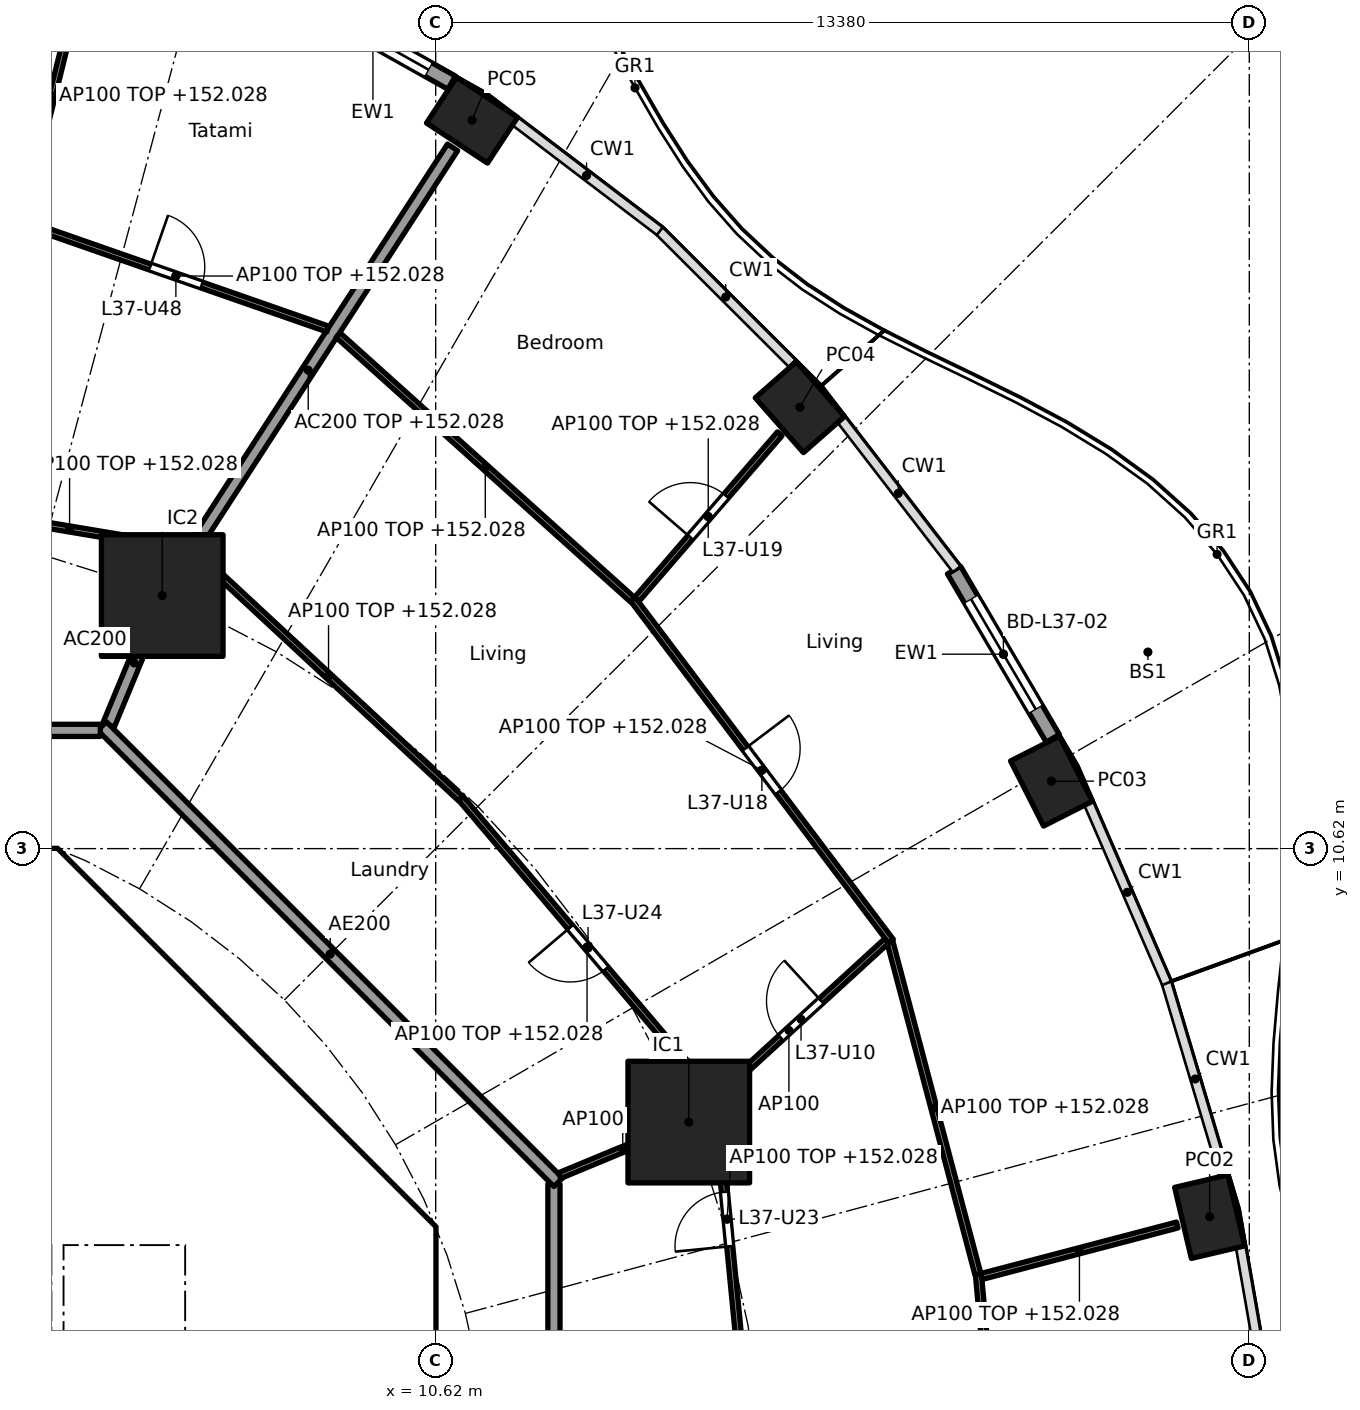
"""IFC4 building model, lengths in metres.
Left out: names, types, materials, properties, quantities, classifications, styles, units other than length and angle.
Written with IfcOpenShell. Run it as: python <this file> out.ifc"""

import sys

from ifc_helpers import new_model, si_unit, direction, frame, frame_2d, origin, origin_2d, place, context, subcontext, project, spatial, polyline, rectangle, hollow_rectangle, outline, extrude, element, fill, save


model = new_model("IFC4")
c1 = context("Model", 3, precision=1e-05, world=origin(), true_north=direction((0.0, 1.0)))
c2 = subcontext(c1, "Body", "Model", "MODEL_VIEW")
j1 = project(units=[si_unit("LENGTHUNIT", "METRE"), si_unit("PLANEANGLEUNIT", "RADIAN")], contexts=[c1])
p1 = place(None, origin())
s1 = spatial("IfcSite", under=j1, at=p1, CompositionType="ELEMENT")
p2 = place(p1, origin())
s2 = spatial("IfcBuilding", under=s1, at=p2, CompositionType="ELEMENT")
p3 = place(p2, frame((0.0, 0.0, 149.2)))
s3 = spatial("IfcBuildingStorey", under=s2, at=p3, CompositionType="ELEMENT", Elevation=149.2)
for number, where, z_axis, x_axis in (
    (1, (23.348, 4.568, 0.0), (0.0, 0.0, 1.0), (-0.229, 0.973, 0.0)),
    (2, (20.747, 11.73, 0.0), (0.0, 0.0, 1.0), (-0.452, 0.892, 0.0)),
    (3, (16.61, 17.88, 0.0), (0.0, 0.0, 1.0), (-0.66, 0.751, 0.0)),
    (4, (11.218, 22.599, 0.0), (0.0, 0.0, 1.0), (-0.836, 0.549, 0.0)),
):
    element("IfcColumn", number, at=place(p3, frame(where, z_axis=z_axis, x_axis=x_axis)), inside=s3, PredefinedType="COLUMN", context=c2, shape_type="SweptSolid", body=[
        extrude(hollow_rectangle(XDim=1.2, YDim=0.9, WallThickness=0.04, at=origin_2d()), origin(), (0.0, 0.0, 1.0), 3.7),
    ])
for number, where, z_axis, x_axis in (
    (5, (14.782, 6.123, 0.0), (0.0, 0.0, 1.0), (1.0, 0.0, 0.0)),
    (6, (6.123, 14.782, 0.0), (0.0, 0.0, 1.0), (1.0, 0.0, 0.0)),
):
    element("IfcColumn", number, at=place(p3, frame(where, z_axis=z_axis, x_axis=x_axis)), inside=s3, PredefinedType="COLUMN", context=c2, shape_type="SweptSolid", body=[
        extrude(rectangle(XDim=2.0, YDim=2.0, at=origin_2d()), origin(), (0.0, 0.0, 1.0), 3.7),
    ])
p4 = place(p3, frame((19.144, 15.201, 0.0), z_axis=(0.0, 0.0, 1.0), x_axis=(0.506314982873, -0.862348617508, 0.0)))
e7 = element("IfcWall", 7, at=p4, inside=s3, PredefinedType="SOLIDWALL", context=c2, shape_type="SweptSolid", body=[
    extrude(rectangle(XDim=3.208, YDim=0.25, at=frame_2d((1.604, 0.0))), origin(), (0.0, 0.0, 1.0), 3.44),
])
p5 = place(p4, frame((0.554, 0.0, 0.0)))
e8 = element("IfcOpeningElement", 8, at=p5, cuts=e7, PredefinedType="OPENING", context=c2, shape_type="SweptSolid", body=[
    extrude(rectangle(XDim=2.1, YDim=2.4, at=frame_2d((1.05, 1.2))), frame((0.0, 0.135, 0.0), z_axis=(0.0, -1.0, 0.0), x_axis=(1.0, 0.0, 0.0)), (0.0, 0.0, 1.0), 0.27),
])
p6 = place(p3, frame((8.293, 24.67, 0.0), z_axis=(0.0, 0.0, 1.0), x_axis=(0.87206688547, -0.489386705241, 0.0)))
e9 = element("IfcWall", 9, at=p6, inside=s3, PredefinedType="SOLIDWALL", context=c2, shape_type="SweptSolid", body=[
    extrude(rectangle(XDim=2.97, YDim=0.25, at=frame_2d((1.485, 0.0))), origin(), (0.0, 0.0, 1.0), 3.44),
])
p7 = place(p6, frame((0.435, 0.0, 0.0)))
e10 = element("IfcOpeningElement", 10, at=p7, cuts=e9, PredefinedType="OPENING", context=c2, shape_type="SweptSolid", body=[
    extrude(rectangle(XDim=2.1, YDim=2.4, at=frame_2d((1.05, 1.2))), frame((0.0, 0.135, 0.0), z_axis=(0.0, -1.0, 0.0), x_axis=(1.0, 0.0, 0.0)), (0.0, 0.0, 1.0), 0.27),
])
p8 = place(p3, frame((9.988, 4.613, 0.0), z_axis=(0.0, 0.0, 1.0), x_axis=(-0.707106781187, 0.707106781187, 0.0)))
e11 = element("IfcWall", 11, at=p8, inside=s3, PredefinedType="SHEAR", context=c2, shape_type="SweptSolid", body=[
    extrude(rectangle(XDim=7.602, YDim=0.6, at=frame_2d((3.801, 0.0))), origin(), (0.0, 0.0, 1.0), 3.44),
])
p9 = place(p8, frame((3.201, 0.0, 0.0)))
e12 = element("IfcOpeningElement", 12, at=p9, cuts=e11, PredefinedType="OPENING", context=c2, shape_type="SweptSolid", body=[
    extrude(rectangle(XDim=1.2, YDim=2.1, at=frame_2d((0.6, 1.05))), frame((0.0, 0.31, 0.0), z_axis=(0.0, -1.0, 0.0), x_axis=(1.0, 0.0, 0.0)), (0.0, 0.0, 1.0), 0.62),
])
p10 = place(p3, frame((6.7, 4.0, 0.0), z_axis=(0.0, 0.0, 1.0), x_axis=(1.0, 0.0, 0.0)))
e13 = element("IfcWall", 13, at=p10, inside=s3, PredefinedType="SOLIDWALL", context=c2, shape_type="SweptSolid", body=[
    extrude(rectangle(XDim=3.325, YDim=0.2, at=frame_2d((1.662, 0.0))), origin(), (0.0, 0.0, 1.0), 3.44),
])
p11 = place(p10, frame((1.25, 0.0, 0.0)))
e14 = element("IfcOpeningElement", 14, at=p11, cuts=e13, PredefinedType="OPENING", context=c2, shape_type="SweptSolid", body=[
    extrude(rectangle(XDim=1.1, YDim=2.1, at=frame_2d((0.55, 1.05))), frame((0.0, 0.11, 0.0), z_axis=(0.0, -1.0, 0.0), x_axis=(1.0, 0.0, 0.0)), (0.0, 0.0, 1.0), 0.22),
])
p12 = place(p3, origin())
e15 = element("IfcWall", 15, at=p12, inside=s3, PredefinedType="SHEAR", context=c2, shape_type="SweptSolid", body=[
    extrude(outline(polyline([(-4.152, 10.025), (-4.401, 9.776), (-4.825, 10.2), (-4.401, 10.625), (4.401, 10.625), (4.825, 10.2), (4.401, 9.776), (4.152, 10.025), (-4.152, 10.025)])), origin(), (0.0, 0.0, 1.0), 3.44),
])
p13 = place(p3, origin())
e16 = element("IfcWall", 16, at=p13, inside=s3, PredefinedType="SHEAR", context=c2, shape_type="SweptSolid", body=[
    extrude(outline(polyline([(9.776, -4.401), (10.025, -4.152), (10.025, -3.801), (10.025, 4.152), (9.776, 4.401), (10.2, 4.825), (10.625, 4.401), (10.625, -4.401), (10.2, -4.825), (9.776, -4.401)])), origin(), (0.0, 0.0, 1.0), 3.44),
])
p14 = place(p3, origin())
e17 = element("IfcWall", 17, at=p14, inside=s3, PredefinedType="SOLIDWALL", context=c2, shape_type="SweptSolid", body=[
    extrude(outline(polyline([(-6.5, 2.1), (-6.7, 2.1), (-6.7, 4.3), (6.7, 4.3), (6.7, 2.1), (6.5, 2.1), (6.5, 4.1), (4.5, 4.1), (4.5, 2.1), (4.3, 2.1), (4.3, 4.1), (2.3, 4.1), (2.3, 2.1), (2.1, 2.1), (2.1, 4.1), (0.1, 4.1), (0.1, 2.1), (-0.1, 2.1), (-0.1, 4.1), (-2.1, 4.1), (-2.1, 2.1), (-2.3, 2.1), (-2.3, 4.1), (-4.3, 4.1), (-4.3, 2.1), (-4.5, 2.1), (-4.5, 4.1), (-6.5, 4.1), (-6.5, 2.1)])), origin(), (0.0, 0.0, 1.0), 3.44),
])
p15 = place(p3, origin())
e18 = element("IfcWall", 18, at=p15, inside=s3, PredefinedType="SOLIDWALL", context=c2, shape_type="SweptSolid", body=[
    extrude(outline(polyline([(7.025, -3.9), (6.7, -3.9), (6.7, 3.9), (7.025, 3.9), (7.025, -3.9)])), origin(), (0.0, 0.0, 1.0), 3.44),
])
p16 = place(p3, frame((5.243, 12.657, 0.0), z_axis=(0.0, 0.0, 1.0), x_axis=(0.38273085373, 0.923859888513, 0.0)))
e19 = element("IfcWall", 19, at=p16, inside=s3, PredefinedType="PARTITIONING", context=c2, shape_type="SweptSolid", body=[
    extrude(rectangle(XDim=2.199, YDim=0.2, at=frame_2d((1.1, 0.0))), origin(), (0.0, 0.0, 1.0), 3.44),
])
p17 = place(p3, frame((6.15, 14.824, 0.0), z_axis=(0.0, 0.0, 1.0), x_axis=(0.543695254109, 0.839282711998, 0.0)))
e20 = element("IfcWall", 20, at=p17, inside=s3, PredefinedType="PARTITIONING", context=c2, shape_type="SweptSolid", body=[
    extrude(rectangle(XDim=8.731, YDim=0.2, at=frame_2d((4.366, 0.0))), origin(), (0.0, 0.0, 1.0), 2.828),
])
p18 = place(p3, frame((12.565, -5.104, 0.0), z_axis=(0.0, 0.0, 1.0), x_axis=(0.0, 1.0, 0.0)))
e21 = element("IfcWall", 21, at=p18, inside=s3, PredefinedType="PARTITIONING", context=c2, shape_type="SweptSolid", body=[
    extrude(rectangle(XDim=10.209, YDim=0.2, at=frame_2d((5.104, 0.0))), origin(), (0.0, 0.0, 1.0), 3.44),
])
p19 = place(p3, frame((12.635, 5.134, 0.0), z_axis=(0.0, 0.0, 1.0), x_axis=(-0.707106781187, 0.707106781187, 0.0)))
e22 = element("IfcWall", 22, at=p19, inside=s3, PredefinedType="PARTITIONING", context=c2, shape_type="SweptSolid", body=[
    extrude(rectangle(XDim=10.609, YDim=0.2, at=frame_2d((5.305, 0.0))), origin(), (0.0, 0.0, 1.0), 3.44),
])
p20 = place(p3, frame((5.104, 12.565, 0.0), z_axis=(0.0, 0.0, 1.0), x_axis=(-1.0, 0.0, 0.0)))
e23 = element("IfcWall", 23, at=p20, inside=s3, PredefinedType="PARTITIONING", context=c2, shape_type="SweptSolid", body=[
    extrude(rectangle(XDim=10.409, YDim=0.2, at=frame_2d((5.205, 0.0))), origin(), (0.0, 0.0, 1.0), 3.44),
])
p21 = place(p3, frame((20.106, -2.542, 0.0), z_axis=(0.0, 0.0, 1.0), x_axis=(-0.090567755363, 0.995890296011, 0.0)))
e24 = element("IfcWall", 24, at=p21, inside=s3, PredefinedType="PARTITIONING", context=c2, shape_type="SweptSolid", body=[
    extrude(rectangle(XDim=6.189, YDim=0.1, at=frame_2d((3.095, 0.0))), origin(), (0.0, 0.0, 1.0), 2.828),
])
p22 = place(p3, frame((15.602, 2.584, 0.0), z_axis=(0.0, 0.0, 1.0), x_axis=(-0.097207196705, 0.995264166394, 0.0)))
e25 = element("IfcWall", 25, at=p22, inside=s3, PredefinedType="PARTITIONING", context=c2, shape_type="SweptSolid", body=[
    extrude(rectangle(XDim=3.906, YDim=0.1, at=frame_2d((1.953, 0.0))), origin(), (0.0, 0.0, 1.0), 2.828),
])
p23 = place(p22, frame((1.503, 0.0, 0.0)))
e26 = element("IfcOpeningElement", 26, at=p23, cuts=e25, PredefinedType="OPENING", context=c2, shape_type="SweptSolid", body=[
    extrude(rectangle(XDim=0.9, YDim=2.1, at=frame_2d((0.45, 1.05))), frame((0.0, 0.06, 0.0), z_axis=(0.0, -1.0, 0.0), x_axis=(1.0, 0.0, 0.0)), (0.0, 0.0, 1.0), 0.12),
])
p24 = place(p3, frame((19.598, 3.584, 0.0), z_axis=(0.0, 0.0, 1.0), x_axis=(0.967108750962, 0.254363251695, 0.0)))
e27 = element("IfcWall", 27, at=p24, inside=s3, PredefinedType="PARTITIONING", context=c2, shape_type="SweptSolid", body=[
    extrude(rectangle(XDim=3.327, YDim=0.1, at=frame_2d((1.663, 0.0))), origin(), (0.0, 0.0, 1.0), 2.828),
])
p25 = place(p3, frame((19.537, 3.62, 0.0), z_axis=(0.0, 0.0, 1.0), x_axis=(-0.255892560316, 0.966705227862, 0.0)))
e28 = element("IfcWall", 28, at=p25, inside=s3, PredefinedType="PARTITIONING", context=c2, shape_type="SweptSolid", body=[
    extrude(rectangle(XDim=5.659, YDim=0.1, at=frame_2d((2.829, 0.0))), origin(), (0.0, 0.0, 1.0), 2.828),
])
p26 = place(p3, frame((12.657, 5.243, 0.0), z_axis=(0.0, 0.0, 1.0), x_axis=(0.923848837015, 0.382757529444, 0.0)))
e29 = element("IfcWall", 29, at=p26, inside=s3, PredefinedType="PARTITIONING", context=c2, shape_type="SweptSolid", body=[
    extrude(rectangle(XDim=2.25, YDim=0.1, at=frame_2d((1.125, 0.0))), origin(), (0.0, 0.0, 1.0), 3.44),
])
p27 = place(p3, frame((14.819, 6.157, 0.0), z_axis=(0.0, 0.0, 1.0), x_axis=(0.737620514432, 0.675215503887, 0.0)))
e30 = element("IfcWall", 30, at=p27, inside=s3, PredefinedType="PARTITIONING", context=c2, shape_type="SweptSolid", body=[
    extrude(rectangle(XDim=4.366, YDim=0.1, at=frame_2d((2.183, 0.0))), origin(), (0.0, 0.0, 1.0), 3.44),
])
p28 = place(p27, frame((2.003, 0.0, 0.0)))
e31 = element("IfcOpeningElement", 31, at=p28, cuts=e30, PredefinedType="OPENING", context=c2, shape_type="SweptSolid", body=[
    extrude(rectangle(XDim=0.9, YDim=2.1, at=frame_2d((0.45, 1.05))), frame((0.0, 0.06, 0.0), z_axis=(0.0, -1.0, 0.0), x_axis=(1.0, 0.0, 0.0)), (0.0, 0.0, 1.0), 0.12),
])
p29 = place(p3, frame((15.185, 6.559, 0.0), z_axis=(0.0, 0.0, 1.0), x_axis=(-0.647361044962, 0.762183493304, 0.0)))
e32 = element("IfcWall", 32, at=p29, inside=s3, PredefinedType="PARTITIONING", context=c2, shape_type="SweptSolid", body=[
    extrude(rectangle(XDim=6.413, YDim=0.1, at=frame_2d((3.207, 0.0))), origin(), (0.0, 0.0, 1.0), 2.828),
])
p30 = place(p29, frame((2.731, 0.0, 0.0)))
e33 = element("IfcOpeningElement", 33, at=p30, cuts=e32, PredefinedType="OPENING", context=c2, shape_type="SweptSolid", body=[
    extrude(rectangle(XDim=0.9, YDim=2.1, at=frame_2d((0.45, 1.05))), frame((0.0, 0.06, 0.0), z_axis=(0.0, -1.0, 0.0), x_axis=(1.0, 0.0, 0.0)), (0.0, 0.0, 1.0), 0.12),
])
p31 = place(p3, frame((18.106, 9.098, 0.0), z_axis=(0.0, 0.0, 1.0), x_axis=(-0.602398572907, 0.798195439325, 0.0)))
e34 = element("IfcWall", 34, at=p31, inside=s3, PredefinedType="PARTITIONING", context=c2, shape_type="SweptSolid", body=[
    extrude(rectangle(XDim=7.044, YDim=0.1, at=frame_2d((3.522, 0.0))), origin(), (0.0, 0.0, 1.0), 2.828),
])
p32 = place(p31, frame((3.072, 0.0, 0.0)))
e35 = element("IfcOpeningElement", 35, at=p32, cuts=e34, PredefinedType="OPENING", context=c2, shape_type="SweptSolid", body=[
    extrude(rectangle(XDim=0.9, YDim=2.1, at=frame_2d((0.45, 1.05))), frame((0.0, 0.06, 0.0), z_axis=(0.0, -1.0, 0.0), x_axis=(1.0, 0.0, 0.0)), (0.0, 0.0, 1.0), 0.12),
])
p33 = place(p3, frame((11.029, 11.443, 0.0), z_axis=(0.0, 0.0, 1.0), x_axis=(-0.733113447346, 0.680106369122, 0.0)))
e36 = element("IfcWall", 36, at=p33, inside=s3, PredefinedType="PARTITIONING", context=c2, shape_type="SweptSolid", body=[
    extrude(rectangle(XDim=5.923, YDim=0.1, at=frame_2d((2.961, 0.0))), origin(), (0.0, 0.0, 1.0), 2.828),
])
p34 = place(p3, frame((13.926, 14.719, 0.0), z_axis=(0.0, 0.0, 1.0), x_axis=(0.653831857253, 0.756639876323, 0.0)))
e37 = element("IfcWall", 37, at=p34, inside=s3, PredefinedType="PARTITIONING", context=c2, shape_type="SweptSolid", body=[
    extrude(rectangle(XDim=3.598, YDim=0.1, at=frame_2d((1.799, 0.0))), origin(), (0.0, 0.0, 1.0), 2.828),
])
p35 = place(p34, frame((1.349, 0.0, 0.0)))
e38 = element("IfcOpeningElement", 38, at=p35, cuts=e37, PredefinedType="OPENING", context=c2, shape_type="SweptSolid", body=[
    extrude(rectangle(XDim=0.9, YDim=2.1, at=frame_2d((0.45, 1.05))), frame((0.0, 0.06, 0.0), z_axis=(0.0, -1.0, 0.0), x_axis=(1.0, 0.0, 0.0)), (0.0, 0.0, 1.0), 0.12),
])
p36 = place(p3, frame((13.856, 14.714, 0.0), z_axis=(0.0, 0.0, 1.0), x_axis=(-0.743799395746, 0.668402916577, 0.0)))
e39 = element("IfcWall", 39, at=p36, inside=s3, PredefinedType="PARTITIONING", context=c2, shape_type="SweptSolid", body=[
    extrude(rectangle(XDim=6.509, YDim=0.1, at=frame_2d((3.254, 0.0))), origin(), (0.0, 0.0, 1.0), 2.828),
])
p37 = place(p3, frame((6.515, 15.556, 0.0), z_axis=(0.0, 0.0, 1.0), x_axis=(-0.986271328884, 0.16513287323, 0.0)))
e40 = element("IfcWall", 40, at=p37, inside=s3, PredefinedType="PARTITIONING", context=c2, shape_type="SweptSolid", body=[
    extrude(rectangle(XDim=3.884, YDim=0.1, at=frame_2d((1.942, 0.0))), origin(), (0.0, 0.0, 1.0), 2.828),
])
p38 = place(p3, frame((8.846, 19.165, 0.0), z_axis=(0.0, 0.0, 1.0), x_axis=(-0.944186503813, 0.329411362915, 0.0)))
e41 = element("IfcWall", 41, at=p38, inside=s3, PredefinedType="PARTITIONING", context=c2, shape_type="SweptSolid", body=[
    extrude(rectangle(XDim=5.293, YDim=0.1, at=frame_2d((2.646, 0.0))), origin(), (0.0, 0.0, 1.0), 2.828),
])
p39 = place(p38, frame((2.197, 0.0, 0.0)))
e42 = element("IfcOpeningElement", 42, at=p39, cuts=e41, PredefinedType="OPENING", context=c2, shape_type="SweptSolid", body=[
    extrude(rectangle(XDim=0.9, YDim=2.1, at=frame_2d((0.45, 1.05))), frame((0.0, 0.06, 0.0), z_axis=(0.0, -1.0, 0.0), x_axis=(1.0, 0.0, 0.0)), (0.0, 0.0, 1.0), 0.12),
])
p40 = place(p3, frame((3.813, 20.973, 0.0), z_axis=(0.0, 0.0, 1.0), x_axis=(0.239977551632, 0.970778437499, 0.0)))
e43 = element("IfcWall", 43, at=p40, inside=s3, PredefinedType="PARTITIONING", context=c2, shape_type="SweptSolid", body=[
    extrude(rectangle(XDim=4.178, YDim=0.1, at=frame_2d((2.089, 0.0))), origin(), (0.0, 0.0, 1.0), 2.828),
])
p41 = place(p5, origin())
e44 = element("IfcDoor", 44, at=p41, inside=s3, OperationType="SLIDING_TO_LEFT", PredefinedType="DOOR", context=c2, shape_type="SweptSolid", body=[
    extrude(rectangle(XDim=2.1, YDim=2.4, at=frame_2d((1.05, 1.2))), frame((0.0, 0.025, 0.0), z_axis=(0.0, -1.0, 0.0), x_axis=(1.0, 0.0, 0.0)), (0.0, 0.0, 1.0), 0.05),
])
fill(e8, e44)
p42 = place(p7, origin())
e45 = element("IfcDoor", 45, at=p42, inside=s3, OperationType="SLIDING_TO_LEFT", PredefinedType="DOOR", context=c2, shape_type="SweptSolid", body=[
    extrude(rectangle(XDim=2.1, YDim=2.4, at=frame_2d((1.05, 1.2))), frame((0.0, 0.025, 0.0), z_axis=(0.0, -1.0, 0.0), x_axis=(1.0, 0.0, 0.0)), (0.0, 0.0, 1.0), 0.05),
])
fill(e10, e45)
p43 = place(p11, frame((1.1, 0.0, 0.0), x_axis=(-1.0, 0.0, 0.0)))
e46 = element("IfcDoor", 46, at=p43, inside=s3, OperationType="SINGLE_SWING_LEFT", PredefinedType="DOOR", context=c2, shape_type="SweptSolid", body=[
    extrude(rectangle(XDim=1.1, YDim=2.1, at=frame_2d((0.55, 1.05))), frame((0.0, 0.025, 0.0), z_axis=(0.0, -1.0, 0.0), x_axis=(1.0, 0.0, 0.0)), (0.0, 0.0, 1.0), 0.05),
])
fill(e14, e46)
p44 = place(p9, origin())
e47 = element("IfcDoor", 47, at=p44, inside=s3, OperationType="SINGLE_SWING_LEFT", PredefinedType="DOOR", context=c2, shape_type="SweptSolid", body=[
    extrude(rectangle(XDim=1.2, YDim=2.1, at=frame_2d((0.6, 1.05))), frame((0.0, 0.025, 0.0), z_axis=(0.0, -1.0, 0.0), x_axis=(1.0, 0.0, 0.0)), (0.0, 0.0, 1.0), 0.05),
])
fill(e12, e47)
p45 = place(p28, origin())
e48 = element("IfcDoor", 48, at=p45, inside=s3, OperationType="SINGLE_SWING_RIGHT", PredefinedType="DOOR", context=c2, shape_type="SweptSolid", body=[
    extrude(rectangle(XDim=0.9, YDim=2.1, at=frame_2d((0.45, 1.05))), frame((0.0, 0.025, 0.0), z_axis=(0.0, -1.0, 0.0), x_axis=(1.0, 0.0, 0.0)), (0.0, 0.0, 1.0), 0.05),
])
fill(e31, e48)
p46 = place(p32, frame((0.9, 0.0, 0.0), x_axis=(-1.0, 0.0, 0.0)))
e49 = element("IfcDoor", 49, at=p46, inside=s3, OperationType="SINGLE_SWING_LEFT", PredefinedType="DOOR", context=c2, shape_type="SweptSolid", body=[
    extrude(rectangle(XDim=0.9, YDim=2.1, at=frame_2d((0.45, 1.05))), frame((0.0, 0.025, 0.0), z_axis=(0.0, -1.0, 0.0), x_axis=(1.0, 0.0, 0.0)), (0.0, 0.0, 1.0), 0.05),
])
fill(e35, e49)
p47 = place(p35, origin())
e50 = element("IfcDoor", 50, at=p47, inside=s3, OperationType="SINGLE_SWING_LEFT", PredefinedType="DOOR", context=c2, shape_type="SweptSolid", body=[
    extrude(rectangle(XDim=0.9, YDim=2.1, at=frame_2d((0.45, 1.05))), frame((0.0, 0.025, 0.0), z_axis=(0.0, -1.0, 0.0), x_axis=(1.0, 0.0, 0.0)), (0.0, 0.0, 1.0), 0.05),
])
fill(e38, e50)
p48 = place(p23, origin())
e51 = element("IfcDoor", 51, at=p48, inside=s3, OperationType="SINGLE_SWING_LEFT", PredefinedType="DOOR", context=c2, shape_type="SweptSolid", body=[
    extrude(rectangle(XDim=0.9, YDim=2.1, at=frame_2d((0.45, 1.05))), frame((0.0, 0.025, 0.0), z_axis=(0.0, -1.0, 0.0), x_axis=(1.0, 0.0, 0.0)), (0.0, 0.0, 1.0), 0.05),
])
fill(e26, e51)
p49 = place(p30, origin())
e52 = element("IfcDoor", 52, at=p49, inside=s3, OperationType="SINGLE_SWING_RIGHT", PredefinedType="DOOR", context=c2, shape_type="SweptSolid", body=[
    extrude(rectangle(XDim=0.9, YDim=2.1, at=frame_2d((0.45, 1.05))), frame((0.0, 0.025, 0.0), z_axis=(0.0, -1.0, 0.0), x_axis=(1.0, 0.0, 0.0)), (0.0, 0.0, 1.0), 0.05),
])
fill(e33, e52)
p50 = place(p39, frame((0.9, 0.0, 0.0), x_axis=(-1.0, 0.0, 0.0)))
e53 = element("IfcDoor", 53, at=p50, inside=s3, OperationType="SINGLE_SWING_LEFT", PredefinedType="DOOR", context=c2, shape_type="SweptSolid", body=[
    extrude(rectangle(XDim=0.9, YDim=2.1, at=frame_2d((0.45, 1.05))), frame((0.0, 0.025, 0.0), z_axis=(0.0, -1.0, 0.0), x_axis=(1.0, 0.0, 0.0)), (0.0, 0.0, 1.0), 0.05),
])
fill(e42, e53)
save(model, sys.argv[1])
